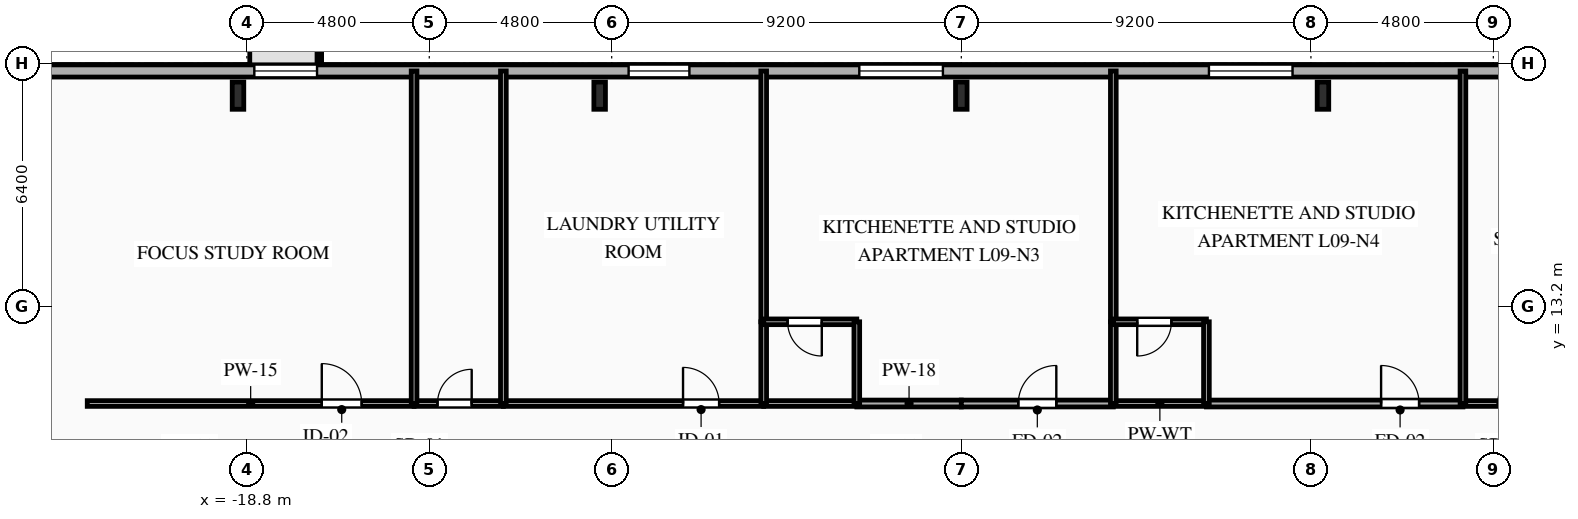
"""IFC4 building model, lengths in metres.
Left out: names, types, materials, properties, quantities, classifications, styles, units other than length and angle.
Written with IfcOpenShell. Run it as: python <this file> out.ifc"""

import sys

from ifc_helpers import new_model, si_unit, direction, frame, frame_2d, origin, origin_2d, place, context, subcontext, project, spatial, rectangle, i_section, extrude, element, fill, save


model = new_model("IFC4")
c1 = context("Model", 3, precision=1e-05, world=origin(), true_north=direction((0.0, 1.0)))
c2 = subcontext(c1, "Body", "Model", "MODEL_VIEW")
j1 = project(units=[si_unit("LENGTHUNIT", "METRE"), si_unit("PLANEANGLEUNIT", "RADIAN")], contexts=[c1])
p1 = place(None, origin())
s1 = spatial("IfcSite", under=j1, at=p1, CompositionType="ELEMENT")
p2 = place(p1, origin())
s2 = spatial("IfcBuilding", under=s1, at=p2, CompositionType="ELEMENT")
p3 = place(p2, frame((0.0, 0.0, 37.05)))
s3 = spatial("IfcBuildingStorey", under=s2, at=p3, CompositionType="ELEMENT", Elevation=37.05)
for number, where, z_axis, x_axis in (
    (1, (9.517, 18.75, 0.0), (0.0, 0.0, 1.0), (1.0, 0.0, 0.0)),
    (2, (0.0, 18.75, 0.0), (0.0, 0.0, 1.0), (1.0, 0.0, 0.0)),
    (3, (-9.517, 18.75, 0.0), (0.0, 0.0, 1.0), (1.0, 0.0, 0.0)),
    (4, (-19.033, 18.75, 0.0), (0.0, 0.0, 1.0), (1.0, 0.0, 0.0)),
):
    element("IfcColumn", number, at=place(p3, frame(where, z_axis=z_axis, x_axis=x_axis)), inside=s3, PredefinedType="COLUMN", context=c2, shape_type="SweptSolid", body=[
        extrude(i_section(OverallWidth=0.304, OverallDepth=0.716, WebThickness=0.021, FlangeThickness=0.04, FilletRadius=0.027, at=origin_2d()), origin(), (0.0, 0.0, 1.0), 3.35),
    ])
p4 = place(p3, frame((-29.2, 19.4, 0.0), z_axis=(0.0, 0.0, 1.0), x_axis=(1.0, 0.0, 0.0)))
e5 = element("IfcWall", 5, at=p4, inside=s3, PredefinedType="SOLIDWALL", context=c2, shape_type="SweptSolid", body=[
    extrude(rectangle(XDim=58.4, YDim=0.32, at=frame_2d((29.2, 0.0))), origin(), (0.0, 0.0, 1.0), 3.035),
])
p5 = place(p4, frame((10.596, 0.0, 0.85)))
e6 = element("IfcOpeningElement", 6, at=p5, cuts=e5, PredefinedType="OPENING", context=c2, shape_type="SweptSolid", body=[
    extrude(rectangle(XDim=1.65, YDim=1.85, at=frame_2d((0.825, 0.925))), frame((0.0, 0.17, 0.0), z_axis=(0.0, -1.0, 0.0), x_axis=(1.0, 0.0, 0.0)), (0.0, 0.0, 1.0), 0.34),
])
p6 = place(p4, frame((20.445, 0.0, 0.85)))
e7 = element("IfcOpeningElement", 7, at=p6, cuts=e5, PredefinedType="OPENING", context=c2, shape_type="SweptSolid", body=[
    extrude(rectangle(XDim=1.6, YDim=1.85, at=frame_2d((0.8, 0.925))), frame((0.0, 0.17, 0.0), z_axis=(0.0, -1.0, 0.0), x_axis=(1.0, 0.0, 0.0)), (0.0, 0.0, 1.0), 0.34),
])
p7 = place(p4, frame((26.516, 0.0, 0.85)))
e8 = element("IfcOpeningElement", 8, at=p7, cuts=e5, PredefinedType="OPENING", context=c2, shape_type="SweptSolid", body=[
    extrude(rectangle(XDim=2.2, YDim=1.85, at=frame_2d((1.1, 0.925))), frame((0.0, 0.17, 0.0), z_axis=(0.0, -1.0, 0.0), x_axis=(1.0, 0.0, 0.0)), (0.0, 0.0, 1.0), 0.34),
])
p8 = place(p4, frame((35.716, 0.0, 0.85)))
e9 = element("IfcOpeningElement", 9, at=p8, cuts=e5, PredefinedType="OPENING", context=c2, shape_type="SweptSolid", body=[
    extrude(rectangle(XDim=2.2, YDim=1.85, at=frame_2d((1.1, 0.925))), frame((0.0, 0.17, 0.0), z_axis=(0.0, -1.0, 0.0), x_axis=(1.0, 0.0, 0.0)), (0.0, 0.0, 1.0), 0.34),
])
p9 = place(p4, frame((44.095, 0.0, 0.85)))
e10 = element("IfcOpeningElement", 10, at=p9, cuts=e5, PredefinedType="OPENING", context=c2, shape_type="SweptSolid", body=[
    extrude(rectangle(XDim=1.65, YDim=1.85, at=frame_2d((0.825, 0.925))), frame((0.0, 0.17, 0.0), z_axis=(0.0, -1.0, 0.0), x_axis=(1.0, 0.0, 0.0)), (0.0, 0.0, 1.0), 0.34),
])
p10 = place(p4, frame((48.975, 0.0, 0.85)))
e11 = element("IfcOpeningElement", 11, at=p10, cuts=e5, PredefinedType="OPENING", context=c2, shape_type="SweptSolid", body=[
    extrude(rectangle(XDim=1.65, YDim=1.85, at=frame_2d((0.825, 0.925))), frame((0.0, 0.17, 0.0), z_axis=(0.0, -1.0, 0.0), x_axis=(1.0, 0.0, 0.0)), (0.0, 0.0, 1.0), 0.34),
])
p11 = place(p4, frame((52.82, 0.0, 0.85)))
e12 = element("IfcOpeningElement", 12, at=p11, cuts=e5, PredefinedType="OPENING", context=c2, shape_type="SweptSolid", body=[
    extrude(rectangle(XDim=1.4, YDim=1.85, at=frame_2d((0.7, 0.925))), frame((0.0, 0.17, 0.0), z_axis=(0.0, -1.0, 0.0), x_axis=(1.0, 0.0, 0.0)), (0.0, 0.0, 1.0), 0.34),
])
p12 = place(p4, frame((55.575, 0.0, 0.85)))
e13 = element("IfcOpeningElement", 13, at=p12, cuts=e5, PredefinedType="OPENING", context=c2, shape_type="SweptSolid", body=[
    extrude(rectangle(XDim=1.65, YDim=1.85, at=frame_2d((0.825, 0.925))), frame((0.0, 0.17, 0.0), z_axis=(0.0, -1.0, 0.0), x_axis=(1.0, 0.0, 0.0)), (0.0, 0.0, 1.0), 0.34),
])
p13 = place(p3, frame((-23.0, 10.65, 0.0), z_axis=(0.0, 0.0, 1.0), x_axis=(1.0, 0.0, 0.0)))
e14 = element("IfcWall", 14, at=p13, inside=s3, PredefinedType="PARTITIONING", context=c2, shape_type="SweptSolid", body=[
    extrude(rectangle(XDim=8.6, YDim=0.15, at=frame_2d((4.3, 0.0))), origin(), (0.0, 0.0, 1.0), 3.035),
])
p14 = place(p13, frame((6.171, 0.0, 0.0)))
e15 = element("IfcOpeningElement", 15, at=p14, cuts=e14, PredefinedType="OPENING", context=c2, shape_type="SweptSolid", body=[
    extrude(rectangle(XDim=1.05, YDim=2.15, at=frame_2d((0.525, 1.075))), frame((0.0, 0.085, 0.0), z_axis=(0.0, -1.0, 0.0), x_axis=(1.0, 0.0, 0.0)), (0.0, 0.0, 1.0), 0.17),
])
p15 = place(p3, frame((-14.4, 10.65, 0.0), z_axis=(0.0, 0.0, 1.0), x_axis=(1.0, 0.0, 0.0)))
e16 = element("IfcWall", 16, at=p15, inside=s3, PredefinedType="PLUMBINGWALL", context=c2, shape_type="SweptSolid", body=[
    extrude(rectangle(XDim=2.35, YDim=0.15, at=frame_2d((1.175, 0.0))), origin(), (0.0, 0.0, 1.0), 3.035),
])
p16 = place(p15, frame((0.616, 0.0, 0.0)))
e17 = element("IfcOpeningElement", 17, at=p16, cuts=e16, PredefinedType="OPENING", context=c2, shape_type="SweptSolid", body=[
    extrude(rectangle(XDim=0.9, YDim=2.1, at=frame_2d((0.45, 1.05))), frame((0.0, 0.085, 0.0), z_axis=(0.0, -1.0, 0.0), x_axis=(1.0, 0.0, 0.0)), (0.0, 0.0, 1.0), 0.17),
])
p17 = place(p3, frame((-12.05, 10.65, 0.0), z_axis=(0.0, 0.0, 1.0), x_axis=(1.0, 0.0, 0.0)))
e18 = element("IfcWall", 18, at=p17, inside=s3, PredefinedType="PARTITIONING", context=c2, shape_type="SweptSolid", body=[
    extrude(rectangle(XDim=6.85, YDim=0.15, at=frame_2d((3.425, 0.0))), origin(), (0.0, 0.0, 1.0), 3.035),
])
p18 = place(p17, frame((4.728, 0.0, 0.0)))
e19 = element("IfcOpeningElement", 19, at=p18, cuts=e18, PredefinedType="OPENING", context=c2, shape_type="SweptSolid", body=[
    extrude(rectangle(XDim=0.95, YDim=2.1, at=frame_2d((0.475, 1.05))), frame((0.0, 0.085, 0.0), z_axis=(0.0, -1.0, 0.0), x_axis=(1.0, 0.0, 0.0)), (0.0, 0.0, 1.0), 0.17),
])
p19 = place(p3, frame((-2.75, 10.65, 0.0), z_axis=(0.0, 0.0, 1.0), x_axis=(1.0, 0.0, 0.0)))
e20 = element("IfcWall", 20, at=p19, inside=s3, PredefinedType="PARTITIONING", context=c2, shape_type="SweptSolid", body=[
    extrude(rectangle(XDim=2.75, YDim=0.18, at=frame_2d((1.375, 0.0))), origin(), (0.0, 0.0, 1.0), 3.035),
])
p20 = place(p3, frame((-5.2, 10.65, 0.0), z_axis=(0.0, 0.0, 1.0), x_axis=(1.0, 0.0, 0.0)))
e21 = element("IfcWall", 21, at=p20, inside=s3, PredefinedType="PLUMBINGWALL", context=c2, shape_type="SweptSolid", body=[
    extrude(rectangle(XDim=2.45, YDim=0.15, at=frame_2d((1.225, 0.0))), origin(), (0.0, 0.0, 1.0), 3.035),
])
p21 = place(p3, frame((0.0, 10.65, 0.0), z_axis=(0.0, 0.0, 1.0), x_axis=(1.0, 0.0, 0.0)))
e22 = element("IfcWall", 22, at=p21, inside=s3, PredefinedType="PARTITIONING", context=c2, shape_type="SweptSolid", body=[
    extrude(rectangle(XDim=4.0, YDim=0.18, at=frame_2d((2.0, 0.0))), origin(), (0.0, 0.0, 1.0), 3.035),
])
p22 = place(p21, frame((1.5, 0.0, 0.0)))
e23 = element("IfcOpeningElement", 23, at=p22, cuts=e22, PredefinedType="OPENING", context=c2, shape_type="SweptSolid", body=[
    extrude(rectangle(XDim=1.0, YDim=2.15, at=frame_2d((0.5, 1.075))), frame((0.0, 0.1, 0.0), z_axis=(0.0, -1.0, 0.0), x_axis=(1.0, 0.0, 0.0)), (0.0, 0.0, 1.0), 0.2),
])
p23 = place(p3, frame((6.45, 10.65, 0.0), z_axis=(0.0, 0.0, 1.0), x_axis=(1.0, 0.0, 0.0)))
e24 = element("IfcWall", 24, at=p23, inside=s3, PredefinedType="PARTITIONING", context=c2, shape_type="SweptSolid", body=[
    extrude(rectangle(XDim=6.75, YDim=0.18, at=frame_2d((3.375, 0.0))), origin(), (0.0, 0.0, 1.0), 3.035),
])
p24 = place(p23, frame((4.596, 0.0, 0.0)))
e25 = element("IfcOpeningElement", 25, at=p24, cuts=e24, PredefinedType="OPENING", context=c2, shape_type="SweptSolid", body=[
    extrude(rectangle(XDim=1.0, YDim=2.15, at=frame_2d((0.5, 1.075))), frame((0.0, 0.1, 0.0), z_axis=(0.0, -1.0, 0.0), x_axis=(1.0, 0.0, 0.0)), (0.0, 0.0, 1.0), 0.2),
])
p25 = place(p3, frame((4.0, 10.65, 0.0), z_axis=(0.0, 0.0, 1.0), x_axis=(1.0, 0.0, 0.0)))
e26 = element("IfcWall", 26, at=p25, inside=s3, PredefinedType="PLUMBINGWALL", context=c2, shape_type="SweptSolid", body=[
    extrude(rectangle(XDim=2.45, YDim=0.15, at=frame_2d((1.225, 0.0))), origin(), (0.0, 0.0, 1.0), 3.035),
])
p26 = place(p3, frame((13.2, 10.65, 0.0), z_axis=(0.0, 0.0, 1.0), x_axis=(1.0, 0.0, 0.0)))
e27 = element("IfcWall", 27, at=p26, inside=s3, PredefinedType="PARTITIONING", context=c2, shape_type="SweptSolid", body=[
    extrude(rectangle(XDim=4.9, YDim=0.15, at=frame_2d((2.45, 0.0))), origin(), (0.0, 0.0, 1.0), 3.035),
])
p27 = place(p26, frame((0.916, 0.0, 0.0)))
e28 = element("IfcOpeningElement", 28, at=p27, cuts=e27, PredefinedType="OPENING", context=c2, shape_type="SweptSolid", body=[
    extrude(rectangle(XDim=1.05, YDim=2.15, at=frame_2d((0.525, 1.075))), frame((0.0, 0.085, 0.0), z_axis=(0.0, -1.0, 0.0), x_axis=(1.0, 0.0, 0.0)), (0.0, 0.0, 1.0), 0.17),
])
for number, where, z_axis, x_axis in (
    (29, (-14.4, 19.4, 0.0), (0.0, 0.0, 1.0), (0.0, -1.0, 0.0)),
    (30, (-12.05, 19.4, 0.0), (0.0, 0.0, 1.0), (0.0, -1.0, 0.0)),
):
    element("IfcWall", number, at=place(p3, frame(where, z_axis=z_axis, x_axis=x_axis)), inside=s3, PredefinedType="PLUMBINGWALL", context=c2, shape_type="SweptSolid", body=[
        extrude(rectangle(XDim=8.75, YDim=0.15, at=frame_2d((4.375, 0.0))), origin(), (0.0, 0.0, 1.0), 3.035),
    ])
p28 = place(p3, frame((-5.2, 19.4, 0.0), z_axis=(0.0, 0.0, 1.0), x_axis=(0.0, -1.0, 0.0)))
e31 = element("IfcWall", 31, at=p28, inside=s3, PredefinedType="PARTITIONING", context=c2, shape_type="SweptSolid", body=[
    extrude(rectangle(XDim=6.6, YDim=0.15, at=frame_2d((3.3, 0.0))), origin(), (0.0, 0.0, 1.0), 3.035),
])
p29 = place(p3, frame((-5.2, 12.8, 0.0), z_axis=(0.0, 0.0, 1.0), x_axis=(0.0, -1.0, 0.0)))
e32 = element("IfcWall", 32, at=p29, inside=s3, PredefinedType="PLUMBINGWALL", context=c2, shape_type="SweptSolid", body=[
    extrude(rectangle(XDim=2.15, YDim=0.15, at=frame_2d((1.075, 0.0))), origin(), (0.0, 0.0, 1.0), 3.035),
])
p30 = place(p3, frame((-2.75, 12.8, 0.0), z_axis=(0.0, 0.0, 1.0), x_axis=(-1.0, 0.0, 0.0)))
e33 = element("IfcWall", 33, at=p30, inside=s3, PredefinedType="PLUMBINGWALL", context=c2, shape_type="SweptSolid", body=[
    extrude(rectangle(XDim=2.45, YDim=0.15, at=frame_2d((1.225, 0.0))), origin(), (0.0, 0.0, 1.0), 3.035),
])
p31 = place(p30, frame((0.921, 0.0, 0.0)))
e34 = element("IfcOpeningElement", 34, at=p31, cuts=e33, PredefinedType="OPENING", context=c2, shape_type="SweptSolid", body=[
    extrude(rectangle(XDim=0.9, YDim=2.1, at=frame_2d((0.45, 1.05))), frame((0.0, 0.085, 0.0), z_axis=(0.0, -1.0, 0.0), x_axis=(1.0, 0.0, 0.0)), (0.0, 0.0, 1.0), 0.17),
])
p32 = place(p3, frame((-2.75, 10.65, 0.0), z_axis=(0.0, 0.0, 1.0), x_axis=(0.0, 1.0, 0.0)))
e35 = element("IfcWall", 35, at=p32, inside=s3, PredefinedType="PLUMBINGWALL", context=c2, shape_type="SweptSolid", body=[
    extrude(rectangle(XDim=2.15, YDim=0.15, at=frame_2d((1.075, 0.0))), origin(), (0.0, 0.0, 1.0), 3.035),
])
p33 = place(p3, frame((4.0, 19.4, 0.0), z_axis=(0.0, 0.0, 1.0), x_axis=(0.0, -1.0, 0.0)))
e36 = element("IfcWall", 36, at=p33, inside=s3, PredefinedType="PARTITIONING", context=c2, shape_type="SweptSolid", body=[
    extrude(rectangle(XDim=6.6, YDim=0.15, at=frame_2d((3.3, 0.0))), origin(), (0.0, 0.0, 1.0), 3.035),
])
p34 = place(p3, frame((4.0, 12.8, 0.0), z_axis=(0.0, 0.0, 1.0), x_axis=(0.0, -1.0, 0.0)))
e37 = element("IfcWall", 37, at=p34, inside=s3, PredefinedType="PLUMBINGWALL", context=c2, shape_type="SweptSolid", body=[
    extrude(rectangle(XDim=2.15, YDim=0.15, at=frame_2d((1.075, 0.0))), origin(), (0.0, 0.0, 1.0), 3.035),
])
p35 = place(p3, frame((6.45, 12.8, 0.0), z_axis=(0.0, 0.0, 1.0), x_axis=(-1.0, 0.0, 0.0)))
e38 = element("IfcWall", 38, at=p35, inside=s3, PredefinedType="PLUMBINGWALL", context=c2, shape_type="SweptSolid", body=[
    extrude(rectangle(XDim=2.45, YDim=0.15, at=frame_2d((1.225, 0.0))), origin(), (0.0, 0.0, 1.0), 3.035),
])
p36 = place(p35, frame((0.921, 0.0, 0.0)))
e39 = element("IfcOpeningElement", 39, at=p36, cuts=e38, PredefinedType="OPENING", context=c2, shape_type="SweptSolid", body=[
    extrude(rectangle(XDim=0.9, YDim=2.1, at=frame_2d((0.45, 1.05))), frame((0.0, 0.085, 0.0), z_axis=(0.0, -1.0, 0.0), x_axis=(1.0, 0.0, 0.0)), (0.0, 0.0, 1.0), 0.17),
])
p37 = place(p3, frame((6.45, 10.65, 0.0), z_axis=(0.0, 0.0, 1.0), x_axis=(0.0, 1.0, 0.0)))
e40 = element("IfcWall", 40, at=p37, inside=s3, PredefinedType="PLUMBINGWALL", context=c2, shape_type="SweptSolid", body=[
    extrude(rectangle(XDim=2.15, YDim=0.15, at=frame_2d((1.075, 0.0))), origin(), (0.0, 0.0, 1.0), 3.035),
])
p38 = place(p3, frame((13.2, 19.4, 0.0), z_axis=(0.0, 0.0, 1.0), x_axis=(0.0, -1.0, 0.0)))
e41 = element("IfcWall", 41, at=p38, inside=s3, PredefinedType="PARTITIONING", context=c2, shape_type="SweptSolid", body=[
    extrude(rectangle(XDim=8.75, YDim=0.15, at=frame_2d((4.375, 0.0))), origin(), (0.0, 0.0, 1.0), 3.035),
])
p39 = place(p5, origin())
e42 = element("IfcWindow", 42, at=p39, inside=s3, PartitioningType="SINGLE_PANEL", PredefinedType="WINDOW", context=c2, shape_type="SweptSolid", body=[
    extrude(rectangle(XDim=1.65, YDim=1.85, at=frame_2d((0.825, 0.925))), frame((0.0, 0.03, 0.0), z_axis=(0.0, -1.0, 0.0), x_axis=(1.0, 0.0, 0.0)), (0.0, 0.0, 1.0), 0.06),
])
fill(e6, e42)
p40 = place(p6, origin())
e43 = element("IfcWindow", 43, at=p40, inside=s3, PartitioningType="SINGLE_PANEL", PredefinedType="WINDOW", context=c2, shape_type="SweptSolid", body=[
    extrude(rectangle(XDim=1.6, YDim=1.85, at=frame_2d((0.8, 0.925))), frame((0.0, 0.03, 0.0), z_axis=(0.0, -1.0, 0.0), x_axis=(1.0, 0.0, 0.0)), (0.0, 0.0, 1.0), 0.06),
])
fill(e7, e43)
p41 = place(p7, origin())
e44 = element("IfcWindow", 44, at=p41, inside=s3, PartitioningType="SINGLE_PANEL", PredefinedType="WINDOW", context=c2, shape_type="SweptSolid", body=[
    extrude(rectangle(XDim=2.2, YDim=1.85, at=frame_2d((1.1, 0.925))), frame((0.0, 0.03, 0.0), z_axis=(0.0, -1.0, 0.0), x_axis=(1.0, 0.0, 0.0)), (0.0, 0.0, 1.0), 0.06),
])
fill(e8, e44)
p42 = place(p8, origin())
e45 = element("IfcWindow", 45, at=p42, inside=s3, PartitioningType="SINGLE_PANEL", PredefinedType="WINDOW", context=c2, shape_type="SweptSolid", body=[
    extrude(rectangle(XDim=2.2, YDim=1.85, at=frame_2d((1.1, 0.925))), frame((0.0, 0.03, 0.0), z_axis=(0.0, -1.0, 0.0), x_axis=(1.0, 0.0, 0.0)), (0.0, 0.0, 1.0), 0.06),
])
fill(e9, e45)
p43 = place(p14, origin())
e46 = element("IfcDoor", 46, at=p43, inside=s3, OperationType="SINGLE_SWING_LEFT", PredefinedType="DOOR", context=c2, shape_type="SweptSolid", body=[
    extrude(rectangle(XDim=1.05, YDim=2.15, at=frame_2d((0.525, 1.075))), frame((0.0, 0.025, 0.0), z_axis=(0.0, -1.0, 0.0), x_axis=(1.0, 0.0, 0.0)), (0.0, 0.0, 1.0), 0.05),
])
fill(e15, e46)
p44 = place(p16, origin())
e47 = element("IfcDoor", 47, at=p44, inside=s3, OperationType="SINGLE_SWING_RIGHT", PredefinedType="DOOR", context=c2, shape_type="SweptSolid", body=[
    extrude(rectangle(XDim=0.9, YDim=2.1, at=frame_2d((0.45, 1.05))), frame((0.0, 0.025, 0.0), z_axis=(0.0, -1.0, 0.0), x_axis=(1.0, 0.0, 0.0)), (0.0, 0.0, 1.0), 0.05),
])
fill(e17, e47)
p45 = place(p18, origin())
e48 = element("IfcDoor", 48, at=p45, inside=s3, OperationType="SINGLE_SWING_LEFT", PredefinedType="DOOR", context=c2, shape_type="SweptSolid", body=[
    extrude(rectangle(XDim=0.95, YDim=2.1, at=frame_2d((0.475, 1.05))), frame((0.0, 0.025, 0.0), z_axis=(0.0, -1.0, 0.0), x_axis=(1.0, 0.0, 0.0)), (0.0, 0.0, 1.0), 0.05),
])
fill(e19, e48)
p46 = place(p22, origin())
e49 = element("IfcDoor", 49, at=p46, inside=s3, OperationType="SINGLE_SWING_RIGHT", PredefinedType="DOOR", context=c2, shape_type="SweptSolid", body=[
    extrude(rectangle(XDim=1.0, YDim=2.15, at=frame_2d((0.5, 1.075))), frame((0.0, 0.025, 0.0), z_axis=(0.0, -1.0, 0.0), x_axis=(1.0, 0.0, 0.0)), (0.0, 0.0, 1.0), 0.05),
])
fill(e23, e49)
p47 = place(p24, origin())
e50 = element("IfcDoor", 50, at=p47, inside=s3, OperationType="SINGLE_SWING_LEFT", PredefinedType="DOOR", context=c2, shape_type="SweptSolid", body=[
    extrude(rectangle(XDim=1.0, YDim=2.15, at=frame_2d((0.5, 1.075))), frame((0.0, 0.025, 0.0), z_axis=(0.0, -1.0, 0.0), x_axis=(1.0, 0.0, 0.0)), (0.0, 0.0, 1.0), 0.05),
])
fill(e25, e50)
p48 = place(p27, origin())
e51 = element("IfcDoor", 51, at=p48, inside=s3, OperationType="SINGLE_SWING_RIGHT", PredefinedType="DOOR", context=c2, shape_type="SweptSolid", body=[
    extrude(rectangle(XDim=1.05, YDim=2.15, at=frame_2d((0.525, 1.075))), frame((0.0, 0.025, 0.0), z_axis=(0.0, -1.0, 0.0), x_axis=(1.0, 0.0, 0.0)), (0.0, 0.0, 1.0), 0.05),
])
fill(e28, e51)
p49 = place(p31, origin())
e52 = element("IfcDoor", 52, at=p49, inside=s3, OperationType="SINGLE_SWING_LEFT", PredefinedType="DOOR", context=c2, shape_type="SweptSolid", body=[
    extrude(rectangle(XDim=0.9, YDim=2.1, at=frame_2d((0.45, 1.05))), frame((0.0, 0.025, 0.0), z_axis=(0.0, -1.0, 0.0), x_axis=(1.0, 0.0, 0.0)), (0.0, 0.0, 1.0), 0.05),
])
fill(e34, e52)
p50 = place(p36, origin())
e53 = element("IfcDoor", 53, at=p50, inside=s3, OperationType="SINGLE_SWING_RIGHT", PredefinedType="DOOR", context=c2, shape_type="SweptSolid", body=[
    extrude(rectangle(XDim=0.9, YDim=2.1, at=frame_2d((0.45, 1.05))), frame((0.0, 0.025, 0.0), z_axis=(0.0, -1.0, 0.0), x_axis=(1.0, 0.0, 0.0)), (0.0, 0.0, 1.0), 0.05),
])
fill(e39, e53)
save(model, sys.argv[1])
